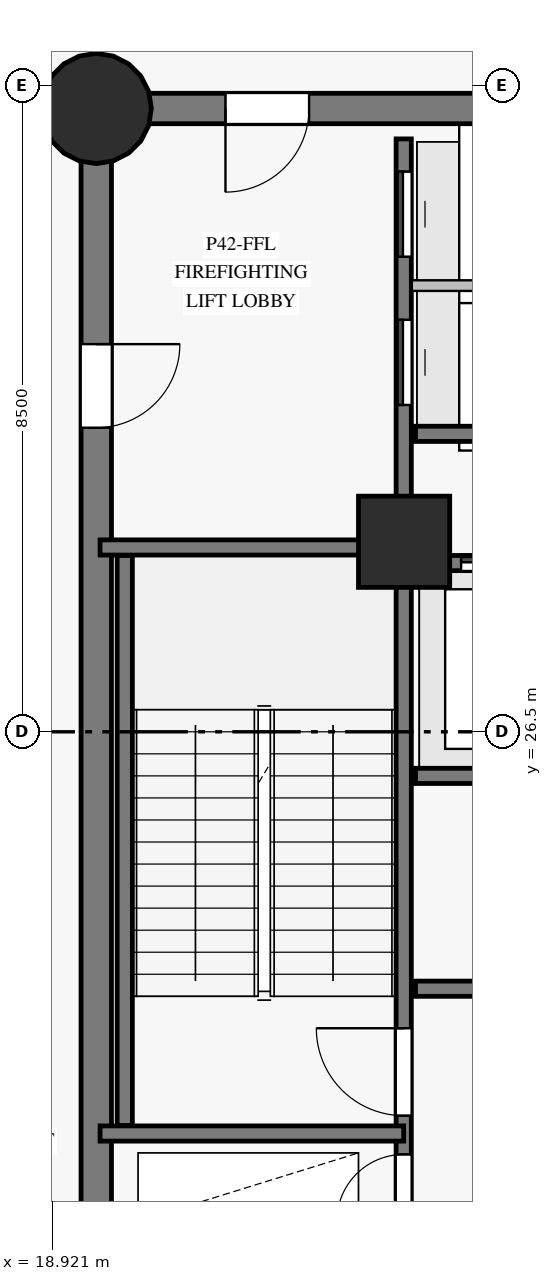
"""IFC4 building model, lengths in metres.
Left out: names, types, materials, properties, quantities, classifications, styles, units other than length and angle.
Written with IfcOpenShell. Run it as: python <this file> out.ifc"""

import sys

from ifc_helpers import new_model, si_unit, direction, frame, frame_2d, origin, origin_with_axes, origin_2d, place, context, subcontext, project, spatial, rectangle, circle, extrude, source, transform, mapped, element, fill, save


model = new_model("IFC4")
c1 = context("Model", 3, precision=1e-05, world=origin(), true_north=direction((0.0, 1.0)))
c2 = subcontext(c1, "Body", "Model", "MODEL_VIEW")
j1 = project(units=[si_unit("LENGTHUNIT", "METRE"), si_unit("PLANEANGLEUNIT", "RADIAN")], contexts=[c1])
p1 = place(None, origin())
s1 = spatial("IfcSite", under=j1, at=p1, CompositionType="ELEMENT")
p2 = place(p1, origin())
s2 = spatial("IfcBuilding", under=s1, at=p2, CompositionType="ELEMENT")
p3 = place(p2, frame((0.0, 0.0, 148.05)))
s3 = spatial("IfcBuildingStorey", under=s2, at=p3, CompositionType="ELEMENT", Elevation=148.05)
p4 = place(p3, frame((26.55, 34.7, 0.0), z_axis=(0.0, 0.0, 1.0), x_axis=(-1.0, 0.0, 0.0)))
e1 = element("IfcWall", 1, at=p4, inside=s3, PredefinedType="SHEAR", context=c2, shape_type="SweptSolid", body=[
    extrude(rectangle(XDim=7.05, YDim=0.4, at=frame_2d((3.525, 0.0))), origin(), (0.0, 0.0, 1.0), 4.275),
])
p5 = place(p4, frame((4.25, 0.0, 0.0)))
e2 = element("IfcOpeningElement", 2, at=p5, cuts=e1, PredefinedType="OPENING", context=c2, shape_type="SweptSolid", body=[
    extrude(rectangle(XDim=1.1, YDim=2.15, at=frame_2d((0.55, 1.075))), frame((0.0, 0.21, 0.0), z_axis=(0.0, -1.0, 0.0), x_axis=(1.0, 0.0, 0.0)), (0.0, 0.0, 1.0), 0.42),
])
p6 = place(p3, frame((19.5, 34.7, 0.0), z_axis=(0.0, 0.0, 1.0), x_axis=(0.0, -1.0, 0.0)))
e3 = element("IfcWall", 3, at=p6, inside=s3, PredefinedType="SHEAR", context=c2, shape_type="SweptSolid", body=[
    extrude(rectangle(XDim=16.4, YDim=0.4, at=frame_2d((8.2, 0.0))), origin(), (0.0, 0.0, 1.0), 4.275),
])
p7 = place(p6, frame((3.1, 0.0, 0.0)))
e4 = element("IfcOpeningElement", 4, at=p7, cuts=e3, PredefinedType="OPENING", context=c2, shape_type="SweptSolid", body=[
    extrude(rectangle(XDim=1.1, YDim=2.15, at=frame_2d((0.55, 1.075))), frame((0.0, 0.21, 0.0), z_axis=(0.0, -1.0, 0.0), x_axis=(1.0, 0.0, 0.0)), (0.0, 0.0, 1.0), 0.42),
])
m1 = source(origin_with_axes(), c2, "Body", "SweptSolid", [
    extrude(circle(Radius=0.725, at=origin_2d()), origin(), (0.0, 0.0, 1.0), 4.5),
])
p8 = place(p3, frame((19.5, 34.7, 0.0), z_axis=(0.0, 0.0, 1.0), x_axis=(1.0, 0.0, 0.0)))
e5 = element("IfcColumn", 5, at=p8, inside=s3, PredefinedType="COLUMN", context=c2, shape_type="MappedRepresentation", body=[
    mapped(m1, transform((0.0, 0.0, 0.0), scale=1.0)),
])
m2 = source(origin_with_axes(), c2, "Body", "SweptSolid", [
    extrude(rectangle(XDim=1.2, YDim=1.2, at=origin_2d()), origin(), (0.0, 0.0, 1.0), 4.5),
])
p9 = place(p3, frame((23.55, 29.0, 0.0), z_axis=(0.0, 0.0, 1.0), x_axis=(1.0, 0.0, 0.0)))
e6 = element("IfcColumn", 6, at=p9, inside=s3, PredefinedType="COLUMN", context=c2, shape_type="MappedRepresentation", body=[
    mapped(m2, transform((0.0, 0.0, 0.0), scale=1.0)),
])
p10 = place(p3, frame((23.545, 18.7, 0.0), z_axis=(0.0, 0.0, 1.0), x_axis=(0.0, 1.0, 0.0)))
e7 = element("IfcWall", 7, at=p10, inside=s3, PredefinedType="SHEAR", context=c2, shape_type="SweptSolid", body=[
    extrude(rectangle(XDim=15.6, YDim=0.2, at=frame_2d((7.8, 0.0))), origin(), (0.0, 0.0, 1.0), 4.275),
])
p11 = place(p10, frame((2.75, 0.0, 0.0)))
e8 = element("IfcOpeningElement", 8, at=p11, cuts=e7, PredefinedType="OPENING", context=c2, shape_type="SweptSolid", body=[
    extrude(rectangle(XDim=1.15, YDim=2.15, at=frame_2d((0.575, 1.075))), frame((0.0, 0.11, 0.0), z_axis=(0.0, -1.0, 0.0), x_axis=(1.0, 0.0, 0.0)), (0.0, 0.0, 1.0), 0.22),
])
p12 = place(p10, frame((0.14, 0.0, 0.0)))
e9 = element("IfcOpeningElement", 9, at=p12, cuts=e7, PredefinedType="OPENING", context=c2, shape_type="SweptSolid", body=[
    extrude(rectangle(XDim=0.88, YDim=2.1, at=frame_2d((0.44, 1.05))), frame((0.0, 0.11, 0.0), z_axis=(0.0, -1.0, 0.0), x_axis=(1.0, 0.0, 0.0)), (0.0, 0.0, 1.0), 0.22),
])
p13 = place(p10, frame((1.36, 0.0, 0.0)))
e10 = element("IfcOpeningElement", 10, at=p13, cuts=e7, PredefinedType="OPENING", context=c2, shape_type="SweptSolid", body=[
    extrude(rectangle(XDim=0.88, YDim=2.1, at=frame_2d((0.44, 1.05))), frame((0.0, 0.11, 0.0), z_axis=(0.0, -1.0, 0.0), x_axis=(1.0, 0.0, 0.0)), (0.0, 0.0, 1.0), 0.22),
])
p14 = place(p10, frame((12.1, 0.0, 0.0)))
e11 = element("IfcOpeningElement", 11, at=p14, cuts=e7, PredefinedType="OPENING", context=c2, shape_type="SweptSolid", body=[
    extrude(rectangle(XDim=1.12, YDim=2.15, at=frame_2d((0.56, 1.075))), frame((0.0, 0.11, 0.0), z_axis=(0.0, -1.0, 0.0), x_axis=(1.0, 0.0, 0.0)), (0.0, 0.0, 1.0), 0.22),
])
p15 = place(p10, frame((14.05, 0.0, 0.0)))
e12 = element("IfcOpeningElement", 12, at=p15, cuts=e7, PredefinedType="OPENING", context=c2, shape_type="SweptSolid", body=[
    extrude(rectangle(XDim=1.12, YDim=2.15, at=frame_2d((0.56, 1.075))), frame((0.0, 0.11, 0.0), z_axis=(0.0, -1.0, 0.0), x_axis=(1.0, 0.0, 0.0)), (0.0, 0.0, 1.0), 0.22),
])
p16 = place(p3, frame((23.7, 23.12, 0.0), z_axis=(0.0, 0.0, 1.0), x_axis=(1.0, 0.0, 0.0)))
e13 = element("IfcWall", 13, at=p16, inside=s3, PredefinedType="SHEAR", context=c2, shape_type="SweptSolid", body=[
    extrude(rectangle(XDim=9.6, YDim=0.2, at=frame_2d((4.8, 0.0))), origin(), (0.0, 0.0, 1.0), 4.275),
])
p17 = place(p16, frame((1.1, 0.0, 0.0)))
e14 = element("IfcOpeningElement", 14, at=p17, cuts=e13, PredefinedType="OPENING", context=c2, shape_type="SweptSolid", body=[
    extrude(rectangle(XDim=0.92, YDim=2.1, at=frame_2d((0.46, 1.05))), frame((0.0, 0.11, 0.0), z_axis=(0.0, -1.0, 0.0), x_axis=(1.0, 0.0, 0.0)), (0.0, 0.0, 1.0), 0.22),
])
p18 = place(p16, frame((5.2, 0.0, 0.0)))
e15 = element("IfcOpeningElement", 15, at=p18, cuts=e13, PredefinedType="OPENING", context=c2, shape_type="SweptSolid", body=[
    extrude(rectangle(XDim=1.0, YDim=2.15, at=frame_2d((0.5, 1.075))), frame((0.0, 0.11, 0.0), z_axis=(0.0, -1.0, 0.0), x_axis=(1.0, 0.0, 0.0)), (0.0, 0.0, 1.0), 0.22),
])
p19 = place(p3, frame((23.7, 25.92, 0.0), z_axis=(0.0, 0.0, 1.0), x_axis=(1.0, 0.0, 0.0)))
e16 = element("IfcWall", 16, at=p19, inside=s3, PredefinedType="SHEAR", context=c2, shape_type="SweptSolid", body=[
    extrude(rectangle(XDim=9.6, YDim=0.2, at=frame_2d((4.8, 0.0))), origin(), (0.0, 0.0, 1.0), 4.275),
])
p20 = place(p3, frame((23.7, 28.72, 0.0), z_axis=(0.0, 0.0, 1.0), x_axis=(1.0, 0.0, 0.0)))
e17 = element("IfcWall", 17, at=p20, inside=s3, PredefinedType="SHEAR", context=c2, shape_type="SweptSolid", body=[
    extrude(rectangle(XDim=9.6, YDim=0.2, at=frame_2d((4.8, 0.0))), origin(), (0.0, 0.0, 1.0), 4.275),
])
p21 = place(p20, frame((0.6, 0.0, 0.0)))
e18 = element("IfcOpeningElement", 18, at=p21, cuts=e17, PredefinedType="OPENING", context=c2, shape_type="SweptSolid", body=[
    extrude(rectangle(XDim=1.1, YDim=2.15, at=frame_2d((0.55, 1.075))), frame((0.0, 0.11, 0.0), z_axis=(0.0, -1.0, 0.0), x_axis=(1.0, 0.0, 0.0)), (0.0, 0.0, 1.0), 0.22),
])
p22 = place(p20, frame((2.98, 0.0, 0.0)))
e19 = element("IfcOpeningElement", 19, at=p22, cuts=e17, PredefinedType="OPENING", context=c2, shape_type="SweptSolid", body=[
    extrude(rectangle(XDim=1.1, YDim=2.15, at=frame_2d((0.55, 1.075))), frame((0.0, 0.11, 0.0), z_axis=(0.0, -1.0, 0.0), x_axis=(1.0, 0.0, 0.0)), (0.0, 0.0, 1.0), 0.22),
])
p23 = place(p20, frame((5.36, 0.0, 0.0)))
e20 = element("IfcOpeningElement", 20, at=p23, cuts=e17, PredefinedType="OPENING", context=c2, shape_type="SweptSolid", body=[
    extrude(rectangle(XDim=1.1, YDim=2.15, at=frame_2d((0.55, 1.075))), frame((0.0, 0.11, 0.0), z_axis=(0.0, -1.0, 0.0), x_axis=(1.0, 0.0, 0.0)), (0.0, 0.0, 1.0), 0.22),
])
p24 = place(p20, frame((7.74, 0.0, 0.0)))
e21 = element("IfcOpeningElement", 21, at=p24, cuts=e17, PredefinedType="OPENING", context=c2, shape_type="SweptSolid", body=[
    extrude(rectangle(XDim=1.1, YDim=2.15, at=frame_2d((0.55, 1.075))), frame((0.0, 0.11, 0.0), z_axis=(0.0, -1.0, 0.0), x_axis=(1.0, 0.0, 0.0)), (0.0, 0.0, 1.0), 0.22),
])
p25 = place(p3, frame((19.875, 21.32, 0.0), z_axis=(0.0, 0.0, 1.0), x_axis=(0.0, 1.0, 0.0)))
e22 = element("IfcWall", 22, at=p25, inside=s3, PredefinedType="SHEAR", context=c2, shape_type="SweptSolid", body=[
    extrude(rectangle(XDim=7.5, YDim=0.2, at=frame_2d((3.75, 0.0))), origin(), (0.0, 0.0, 1.0), 4.275),
])
for number, where, z_axis, x_axis in (
    (23, (19.55, 21.215, 0.0), (0.0, 0.0, 1.0), (1.0, 0.0, 0.0)),
    (24, (19.55, 28.925, 0.0), (0.0, 0.0, 1.0), (1.0, 0.0, 0.0)),
):
    element("IfcWall", number, at=place(p3, frame(where, z_axis=z_axis, x_axis=x_axis)), inside=s3, PredefinedType="SHEAR", context=c2, shape_type="SweptSolid", body=[
        extrude(rectangle(XDim=3.995, YDim=0.2, at=frame_2d((1.998, 0.0))), origin(), (0.0, 0.0, 1.0), 4.275),
    ])
p26 = place(p3, frame((23.7, 30.42, 0.0), z_axis=(0.0, 0.0, 1.0), x_axis=(1.0, 0.0, 0.0)))
e25 = element("IfcWall", 25, at=p26, inside=s3, PredefinedType="SHEAR", context=c2, shape_type="SweptSolid", body=[
    extrude(rectangle(XDim=2.78, YDim=0.2, at=frame_2d((1.39, 0.0))), origin(), (0.0, 0.0, 1.0), 4.275),
])
p27 = place(p3, frame((23.652, 32.37, 0.0), z_axis=(0.0, 0.0, 1.0), x_axis=(1.0, 0.0, 0.0)))
e26 = element("IfcWall", 26, at=p27, inside=s3, PredefinedType="PARTITIONING", context=c2, shape_type="SweptSolid", body=[
    extrude(rectangle(XDim=2.828, YDim=0.14, at=frame_2d((1.414, 0.0))), origin(), (0.0, 0.0, 1.0), 4.275),
])
m3 = source(origin_with_axes(), c2, "Body", "SweptSolid", [
    extrude(rectangle(XDim=1.15, YDim=2.15, at=frame_2d((0.575, 1.075))), frame((0.0, 0.025, 0.0), z_axis=(0.0, -1.0, 0.0), x_axis=(1.0, 0.0, 0.0)), (0.0, 0.0, 1.0), 0.05),
])
p28 = place(p11, origin())
e27 = element("IfcDoor", 27, at=p28, inside=s3, OperationType="SINGLE_SWING_RIGHT", PredefinedType="DOOR", context=c2, shape_type="MappedRepresentation", body=[
    mapped(m3, transform((0.0, 0.0, 0.0), scale=1.0)),
])
fill(e8, e27)
m4 = source(origin_with_axes(), c2, "Body", "SweptSolid", [
    extrude(rectangle(XDim=1.1, YDim=2.15, at=frame_2d((0.55, 1.075))), frame((0.0, 0.025, 0.0), z_axis=(0.0, -1.0, 0.0), x_axis=(1.0, 0.0, 0.0)), (0.0, 0.0, 1.0), 0.05),
])
p29 = place(p5, origin())
e28 = element("IfcDoor", 28, at=p29, inside=s3, OperationType="SINGLE_SWING_RIGHT", PredefinedType="DOOR", context=c2, shape_type="MappedRepresentation", body=[
    mapped(m4, transform((0.0, 0.0, 0.0), scale=1.0)),
])
fill(e2, e28)
p30 = place(p7, origin())
e29 = element("IfcDoor", 29, at=p30, inside=s3, OperationType="SINGLE_SWING_LEFT", PredefinedType="DOOR", context=c2, shape_type="MappedRepresentation", body=[
    mapped(m4, transform((0.0, 0.0, 0.0), scale=1.0)),
])
fill(e4, e29)
m5 = source(origin_with_axes(), c2, "Body", "SweptSolid", [
    extrude(rectangle(XDim=0.88, YDim=2.1, at=frame_2d((0.44, 1.05))), frame((0.0, 0.025, 0.0), z_axis=(0.0, -1.0, 0.0), x_axis=(1.0, 0.0, 0.0)), (0.0, 0.0, 1.0), 0.05),
])
p31 = place(p13, origin())
e30 = element("IfcDoor", 30, at=p31, inside=s3, OperationType="SINGLE_SWING_LEFT", PredefinedType="DOOR", context=c2, shape_type="MappedRepresentation", body=[
    mapped(m5, transform((0.0, 0.0, 0.0), scale=1.0)),
])
fill(e10, e30)
p32 = place(p21, origin())
e31 = element("IfcDoor", 31, at=p32, inside=s3, OperationType="SLIDING_TO_LEFT", PredefinedType="DOOR", context=c2, shape_type="MappedRepresentation", body=[
    mapped(m4, transform((0.0, 0.0, 0.0), scale=1.0)),
])
fill(e18, e31)
m6 = source(origin_with_axes(), c2, "Body", "SweptSolid", [
    extrude(rectangle(XDim=1.12, YDim=2.15, at=frame_2d((0.56, 1.075))), frame((0.0, 0.025, 0.0), z_axis=(0.0, -1.0, 0.0), x_axis=(1.0, 0.0, 0.0)), (0.0, 0.0, 1.0), 0.05),
])
p33 = place(p14, origin())
e32 = element("IfcDoor", 32, at=p33, inside=s3, OperationType="SLIDING_TO_LEFT", PredefinedType="DOOR", context=c2, shape_type="MappedRepresentation", body=[
    mapped(m6, transform((0.0, 0.0, 0.0), scale=1.0)),
])
fill(e11, e32)
p34 = place(p15, origin())
e33 = element("IfcDoor", 33, at=p34, inside=s3, OperationType="SLIDING_TO_RIGHT", PredefinedType="DOOR", context=c2, shape_type="MappedRepresentation", body=[
    mapped(m6, transform((0.0, 0.0, 0.0), scale=1.0)),
])
fill(e12, e33)
save(model, sys.argv[1])
